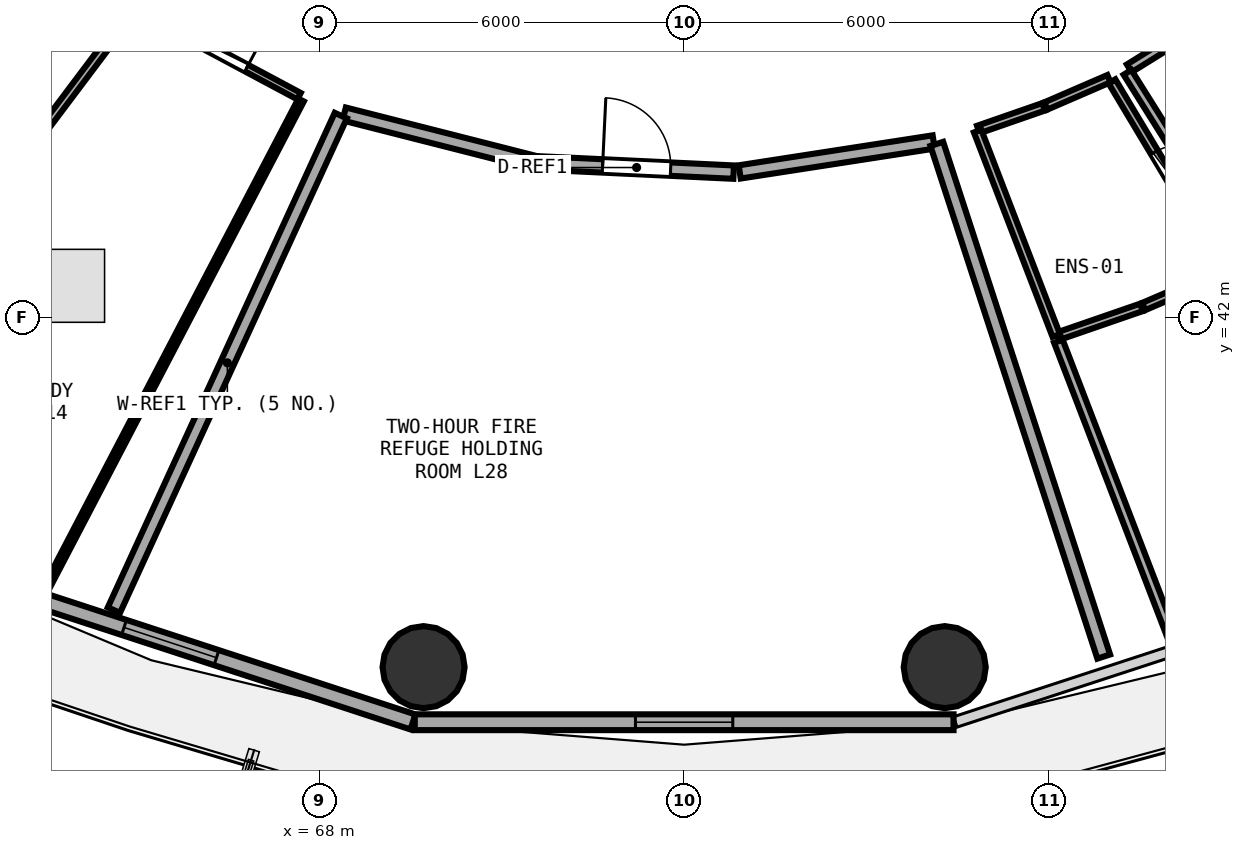
"""IFC4 building model, lengths in metres.
Left out: names, types, materials, properties, quantities, classifications, styles, units other than length and angle.
Written with IfcOpenShell. Run it as: python <this file> out.ifc"""

import sys

from ifc_helpers import new_model, si_unit, direction, frame, frame_2d, origin, origin_2d, place, context, subcontext, project, spatial, rectangle, circle, extrude, element, fill, save


model = new_model("IFC4")
c1 = context("Model", 3, precision=1e-05, world=origin(), true_north=direction((0.0, 1.0)))
c2 = subcontext(c1, "Body", "Model", "MODEL_VIEW")
j1 = project(units=[si_unit("LENGTHUNIT", "METRE"), si_unit("PLANEANGLEUNIT", "RADIAN")], contexts=[c1])
p1 = place(None, origin())
s1 = spatial("IfcSite", under=j1, at=p1, CompositionType="ELEMENT")
p2 = place(p1, origin())
s2 = spatial("IfcBuilding", under=s1, at=p2, CompositionType="ELEMENT")
p3 = place(p2, frame((0.0, 0.0, 110.1)))
s3 = spatial("IfcBuildingStorey", under=s2, at=p3, CompositionType="ELEMENT", Elevation=110.1)
for number, where, z_axis, x_axis in (
    (1, (69.714, 36.255, 0.0), (0.0, 0.0, 1.0), (1.0, 0.0, 0.0)),
    (2, (78.286, 36.255, 0.0), (0.0, 0.0, 1.0), (1.0, 0.0, 0.0)),
):
    element("IfcColumn", number, at=place(p3, frame(where, z_axis=z_axis, x_axis=x_axis)), inside=s3, PredefinedType="COLUMN", context=c2, shape_type="SweptSolid", body=[
        extrude(circle(Radius=0.675, at=origin_2d()), origin(), (0.0, 0.0, 1.0), 3.75),
    ])
p4 = place(p3, frame((61.214, 38.077, 0.0), z_axis=(0.0, 0.0, 1.0), x_axis=(0.950471101963, -0.310812941064, 0.0)))
e3 = element("IfcWall", 3, at=p4, inside=s3, PredefinedType="SOLIDWALL", context=c2, shape_type="SweptSolid", body=[
    extrude(rectangle(XDim=8.76, YDim=0.26, at=frame_2d((4.38, 0.0))), origin(), (0.0, 0.0, 1.0), 3.475),
])
p5 = place(p4, frame((3.76, 0.0, 0.85)))
e4 = element("IfcOpeningElement", 4, at=p5, cuts=e3, PredefinedType="OPENING", context=c2, shape_type="SweptSolid", body=[
    extrude(rectangle(XDim=1.6, YDim=1.45, at=frame_2d((0.8, 0.725))), frame((0.0, 0.14, 0.0), z_axis=(0.0, -1.0, 0.0), x_axis=(1.0, 0.0, 0.0)), (0.0, 0.0, 1.0), 0.28),
])
p6 = place(p3, frame((69.57, 35.349, 0.0), z_axis=(0.0, 0.0, 1.0), x_axis=(1.0, 0.0, 0.0)))
e5 = element("IfcWall", 5, at=p6, inside=s3, PredefinedType="SOLIDWALL", context=c2, shape_type="SweptSolid", body=[
    extrude(rectangle(XDim=8.861, YDim=0.26, at=frame_2d((4.43, 0.0))), origin(), (0.0, 0.0, 1.0), 3.475),
])
p7 = place(p6, frame((3.63, 0.0, 0.85)))
e6 = element("IfcOpeningElement", 6, at=p7, cuts=e5, PredefinedType="OPENING", context=c2, shape_type="SweptSolid", body=[
    extrude(rectangle(XDim=1.6, YDim=1.45, at=frame_2d((0.8, 0.725))), frame((0.0, 0.14, 0.0), z_axis=(0.0, -1.0, 0.0), x_axis=(1.0, 0.0, 0.0)), (0.0, 0.0, 1.0), 0.28),
])
p8 = place(p3, frame((71.622, 44.547, 0.0), z_axis=(0.0, 0.0, 1.0), x_axis=(0.998877795438, -0.0473619022, 0.0)))
e7 = element("IfcWall", 7, at=p8, inside=s3, PredefinedType="SOLIDWALL", context=c2, shape_type="SweptSolid", body=[
    extrude(rectangle(XDim=3.196, YDim=0.22, at=frame_2d((1.598, 0.0))), origin(), (0.0, 0.0, 1.0), 3.48),
])
p9 = place(p8, frame((1.038, 0.0, 0.0)))
e8 = element("IfcOpeningElement", 8, at=p9, cuts=e7, PredefinedType="OPENING", context=c2, shape_type="SweptSolid", body=[
    extrude(rectangle(XDim=1.12, YDim=2.1, at=frame_2d((0.56, 1.05))), frame((0.0, 0.12, 0.0), z_axis=(0.0, -1.0, 0.0), x_axis=(1.0, 0.0, 0.0)), (0.0, 0.0, 1.0), 0.24),
])
p10 = place(p3, frame((81.036, 45.889, 0.0), z_axis=(0.0, 0.0, 1.0), x_axis=(0.513583206277, -0.858039795249, 0.0)))
e9 = element("IfcWall", 9, at=p10, inside=s3, PredefinedType="PLUMBINGWALL", context=c2, shape_type="SweptSolid", body=[
    extrude(rectangle(XDim=3.581, YDim=0.13, at=frame_2d((1.791, 0.0))), origin(), (0.0, 0.0, 1.0), 3.175),
])
p11 = place(p10, frame((1.361, 0.0, 0.0)))
e10 = element("IfcOpeningElement", 10, at=p11, cuts=e9, PredefinedType="OPENING", context=c2, shape_type="SweptSolid", body=[
    extrude(rectangle(XDim=0.86, YDim=2.05, at=frame_2d((0.43, 1.025))), frame((0.0, 0.075, 0.0), z_axis=(0.0, -1.0, 0.0), x_axis=(1.0, 0.0, 0.0)), (0.0, 0.0, 1.0), 0.15),
])
p12 = place(p3, frame((81.321, 46.103, 0.0), z_axis=(0.0, 0.0, 1.0), x_axis=(0.849017842519, 0.528364176572, 0.0)))
e11 = element("IfcWall", 11, at=p12, inside=s3, PredefinedType="PARTITIONING", context=c2, shape_type="SweptSolid", body=[
    extrude(rectangle(XDim=2.7, YDim=0.15, at=frame_2d((1.35, 0.0))), origin(), (0.0, 0.0, 1.0), 2.925),
])
p13 = place(p12, frame((0.875, 0.0, 0.0)))
e12 = element("IfcOpeningElement", 12, at=p13, cuts=e11, PredefinedType="OPENING", context=c2, shape_type="SweptSolid", body=[
    extrude(rectangle(XDim=0.95, YDim=2.08, at=frame_2d((0.475, 1.04))), frame((0.0, 0.085, 0.0), z_axis=(0.0, -1.0, 0.0), x_axis=(1.0, 0.0, 0.0)), (0.0, 0.0, 1.0), 0.17),
])
p14 = place(p3, frame((65.147, 46.992, 0.0), z_axis=(0.0, 0.0, 1.0), x_axis=(0.881924316784, -0.471391026077, 0.0)))
e13 = element("IfcWall", 13, at=p14, inside=s3, PredefinedType="PARTITIONING", context=c2, shape_type="SweptSolid", body=[
    extrude(rectangle(XDim=2.856, YDim=0.12, at=frame_2d((1.428, 0.0))), origin(), (0.0, 0.0, 1.0), 2.925),
])
p15 = place(p14, frame((0.978, 0.0, 0.0)))
e14 = element("IfcOpeningElement", 14, at=p15, cuts=e13, PredefinedType="OPENING", context=c2, shape_type="SweptSolid", body=[
    extrude(rectangle(XDim=0.9, YDim=2.08, at=frame_2d((0.45, 1.04))), frame((0.0, 0.07, 0.0), z_axis=(0.0, -1.0, 0.0), x_axis=(1.0, 0.0, 0.0)), (0.0, 0.0, 1.0), 0.14),
])
p16 = place(p3, frame((68.409, 45.352, 0.0), z_axis=(0.0, 0.0, 1.0), x_axis=(0.969137775127, -0.24651972096, 0.0)))
e15 = element("IfcWall", 15, at=p16, inside=s3, PredefinedType="SOLIDWALL", context=c2, shape_type="SweptSolid", body=[
    extrude(rectangle(XDim=3.214, YDim=0.22, at=frame_2d((1.607, 0.0))), origin(), (0.0, 0.0, 1.0), 3.235),
])
p17 = place(p3, frame((74.914, 44.399, 0.0), z_axis=(0.0, 0.0, 1.0), x_axis=(0.988282336333, 0.152636901479, 0.0)))
e16 = element("IfcWall", 16, at=p17, inside=s3, PredefinedType="SOLIDWALL", context=c2, shape_type="SweptSolid", body=[
    extrude(rectangle(XDim=3.228, YDim=0.22, at=frame_2d((1.614, 0.0))), origin(), (0.0, 0.0, 1.0), 3.48),
])
p18 = place(p3, frame((78.156, 44.86, 0.0), z_axis=(0.0, 0.0, 1.0), x_axis=(0.309595310809, -0.950868415463, 0.0)))
e17 = element("IfcWall", 17, at=p18, inside=s3, PredefinedType="SOLIDWALL", context=c2, shape_type="SweptSolid", body=[
    extrude(rectangle(XDim=8.867, YDim=0.22, at=frame_2d((4.433, 0.0))), origin(), (0.0, 0.0, 1.0), 2.925),
])
p19 = place(p3, frame((64.622, 37.193, 0.0), z_axis=(0.0, 0.0, 1.0), x_axis=(0.417058666801, 0.908879567625, 0.0)))
e18 = element("IfcWall", 18, at=p19, inside=s3, PredefinedType="SOLIDWALL", context=c2, shape_type="SweptSolid", body=[
    extrude(rectangle(XDim=8.948, YDim=0.22, at=frame_2d((4.474, 0.0))), origin(), (0.0, 0.0, 1.0), 2.925),
])
p20 = place(p3, frame((78.838, 45.097, 0.0), z_axis=(0.0, 0.0, 1.0), x_axis=(0.94463296612, 0.328128876084, 0.0)))
e19 = element("IfcWall", 19, at=p20, inside=s3, PredefinedType="PLUMBINGWALL", context=c2, shape_type="SweptSolid", body=[
    extrude(rectangle(XDim=1.136, YDim=0.13, at=frame_2d((0.568, 0.0))), origin(), (0.0, 0.0, 1.0), 3.235),
])
p21 = place(p3, frame((79.948, 45.484, 0.0), z_axis=(0.0, 0.0, 1.0), x_axis=(0.917754995973, 0.397147034946, 0.0)))
e20 = element("IfcWall", 20, at=p21, inside=s3, PredefinedType="PLUMBINGWALL", context=c2, shape_type="SweptSolid", body=[
    extrude(rectangle(XDim=1.131, YDim=0.13, at=frame_2d((0.565, 0.0))), origin(), (0.0, 0.0, 1.0), 2.925),
])
p22 = place(p3, frame((82.888, 42.757, 0.0), z_axis=(0.0, 0.0, 1.0), x_axis=(-0.918751832311, -0.394835498183, 0.0)))
e21 = element("IfcWall", 21, at=p22, inside=s3, PredefinedType="PLUMBINGWALL", context=c2, shape_type="SweptSolid", body=[
    extrude(rectangle(XDim=1.447, YDim=0.13, at=frame_2d((0.724, 0.0))), origin(), (0.0, 0.0, 1.0), 3.48),
])
p23 = place(p3, frame((81.521, 42.171, 0.0), z_axis=(0.0, 0.0, 1.0), x_axis=(-0.94522127907, -0.326430289025, 0.0)))
e22 = element("IfcWall", 22, at=p23, inside=s3, PredefinedType="PLUMBINGWALL", context=c2, shape_type="SweptSolid", body=[
    extrude(rectangle(XDim=1.455, YDim=0.13, at=frame_2d((0.727, 0.0))), origin(), (0.0, 0.0, 1.0), 3.48),
])
p24 = place(p3, frame((80.12, 41.709, 0.0), z_axis=(0.0, 0.0, 1.0), x_axis=(-0.359078976073, 0.933307178233, 0.0)))
e23 = element("IfcWall", 23, at=p24, inside=s3, PredefinedType="PLUMBINGWALL", context=c2, shape_type="SweptSolid", body=[
    extrude(rectangle(XDim=3.603, YDim=0.13, at=frame_2d((1.801, 0.0))), origin(), (0.0, 0.0, 1.0), 2.925),
])
p25 = place(p3, frame((82.027, 36.744, 0.0), z_axis=(0.0, 0.0, 1.0), x_axis=(-0.358828576498, 0.933403477971, 0.0)))
e24 = element("IfcWall", 24, at=p25, inside=s3, PredefinedType="PARTITIONING", context=c2, shape_type="SweptSolid", body=[
    extrude(rectangle(XDim=5.218, YDim=0.15, at=frame_2d((2.609, 0.0))), origin(), (0.0, 0.0, 1.0), 2.975),
])
p26 = place(p3, frame((81.996, 44.913, 0.0), z_axis=(0.0, 0.0, 1.0), x_axis=(-0.53138752038, 0.847128858666, 0.0)))
e25 = element("IfcWall", 25, at=p26, inside=s3, PredefinedType="PARTITIONING", context=c2, shape_type="SweptSolid", body=[
    extrude(rectangle(XDim=1.327, YDim=0.15, at=frame_2d((0.664, 0.0))), origin(), (0.0, 0.0, 1.0), 3.235),
])
p27 = place(p3, frame((64.956, 47.089, 0.0), z_axis=(0.0, 0.0, 1.0), x_axis=(-0.600999501428, -0.799249397425, 0.0)))
e26 = element("IfcWall", 26, at=p27, inside=s3, PredefinedType="PLUMBINGWALL", context=c2, shape_type="SweptSolid", body=[
    extrude(rectangle(XDim=3.359, YDim=0.13, at=frame_2d((1.68, 0.0))), origin(), (0.0, 0.0, 1.0), 2.925),
])
p28 = place(p3, frame((67.7, 45.582, 0.0), z_axis=(0.0, 0.0, 1.0), x_axis=(-0.462926984727, -0.88639641629, 0.0)))
e27 = element("IfcWall", 27, at=p28, inside=s3, PredefinedType="PARTITIONING", context=c2, shape_type="SweptSolid", body=[
    extrude(rectangle(XDim=8.99, YDim=0.1, at=frame_2d((4.495, 0.0))), origin(), (0.0, 0.0, 1.0), 2.925),
])
p29 = place(p5, origin())
e28 = element("IfcWindow", 28, at=p29, inside=s3, PartitioningType="SINGLE_PANEL", PredefinedType="WINDOW", context=c2, shape_type="SweptSolid", body=[
    extrude(rectangle(XDim=1.6, YDim=1.45, at=frame_2d((0.8, 0.725))), frame((0.0, 0.03, 0.0), z_axis=(0.0, -1.0, 0.0), x_axis=(1.0, 0.0, 0.0)), (0.0, 0.0, 1.0), 0.06),
])
fill(e4, e28)
p30 = place(p7, origin())
e29 = element("IfcWindow", 29, at=p30, inside=s3, PartitioningType="SINGLE_PANEL", PredefinedType="WINDOW", context=c2, shape_type="SweptSolid", body=[
    extrude(rectangle(XDim=1.6, YDim=1.45, at=frame_2d((0.8, 0.725))), frame((0.0, 0.03, 0.0), z_axis=(0.0, -1.0, 0.0), x_axis=(1.0, 0.0, 0.0)), (0.0, 0.0, 1.0), 0.06),
])
fill(e6, e29)
p31 = place(p9, origin())
e30 = element("IfcDoor", 30, at=p31, inside=s3, OperationType="SINGLE_SWING_LEFT", PredefinedType="DOOR", context=c2, shape_type="SweptSolid", body=[
    extrude(rectangle(XDim=1.12, YDim=2.1, at=frame_2d((0.56, 1.05))), frame((0.0, 0.025, 0.0), z_axis=(0.0, -1.0, 0.0), x_axis=(1.0, 0.0, 0.0)), (0.0, 0.0, 1.0), 0.05),
])
fill(e8, e30)
p32 = place(p11, origin())
e31 = element("IfcDoor", 31, at=p32, inside=s3, OperationType="SINGLE_SWING_RIGHT", PredefinedType="DOOR", context=c2, shape_type="SweptSolid", body=[
    extrude(rectangle(XDim=0.86, YDim=2.05, at=frame_2d((0.43, 1.025))), frame((0.0, 0.025, 0.0), z_axis=(0.0, -1.0, 0.0), x_axis=(1.0, 0.0, 0.0)), (0.0, 0.0, 1.0), 0.05),
])
fill(e10, e31)
p33 = place(p15, origin())
e32 = element("IfcDoor", 32, at=p33, inside=s3, OperationType="SINGLE_SWING_RIGHT", PredefinedType="DOOR", context=c2, shape_type="SweptSolid", body=[
    extrude(rectangle(XDim=0.9, YDim=2.08, at=frame_2d((0.45, 1.04))), frame((0.0, 0.025, 0.0), z_axis=(0.0, -1.0, 0.0), x_axis=(1.0, 0.0, 0.0)), (0.0, 0.0, 1.0), 0.05),
])
fill(e14, e32)
save(model, sys.argv[1])
